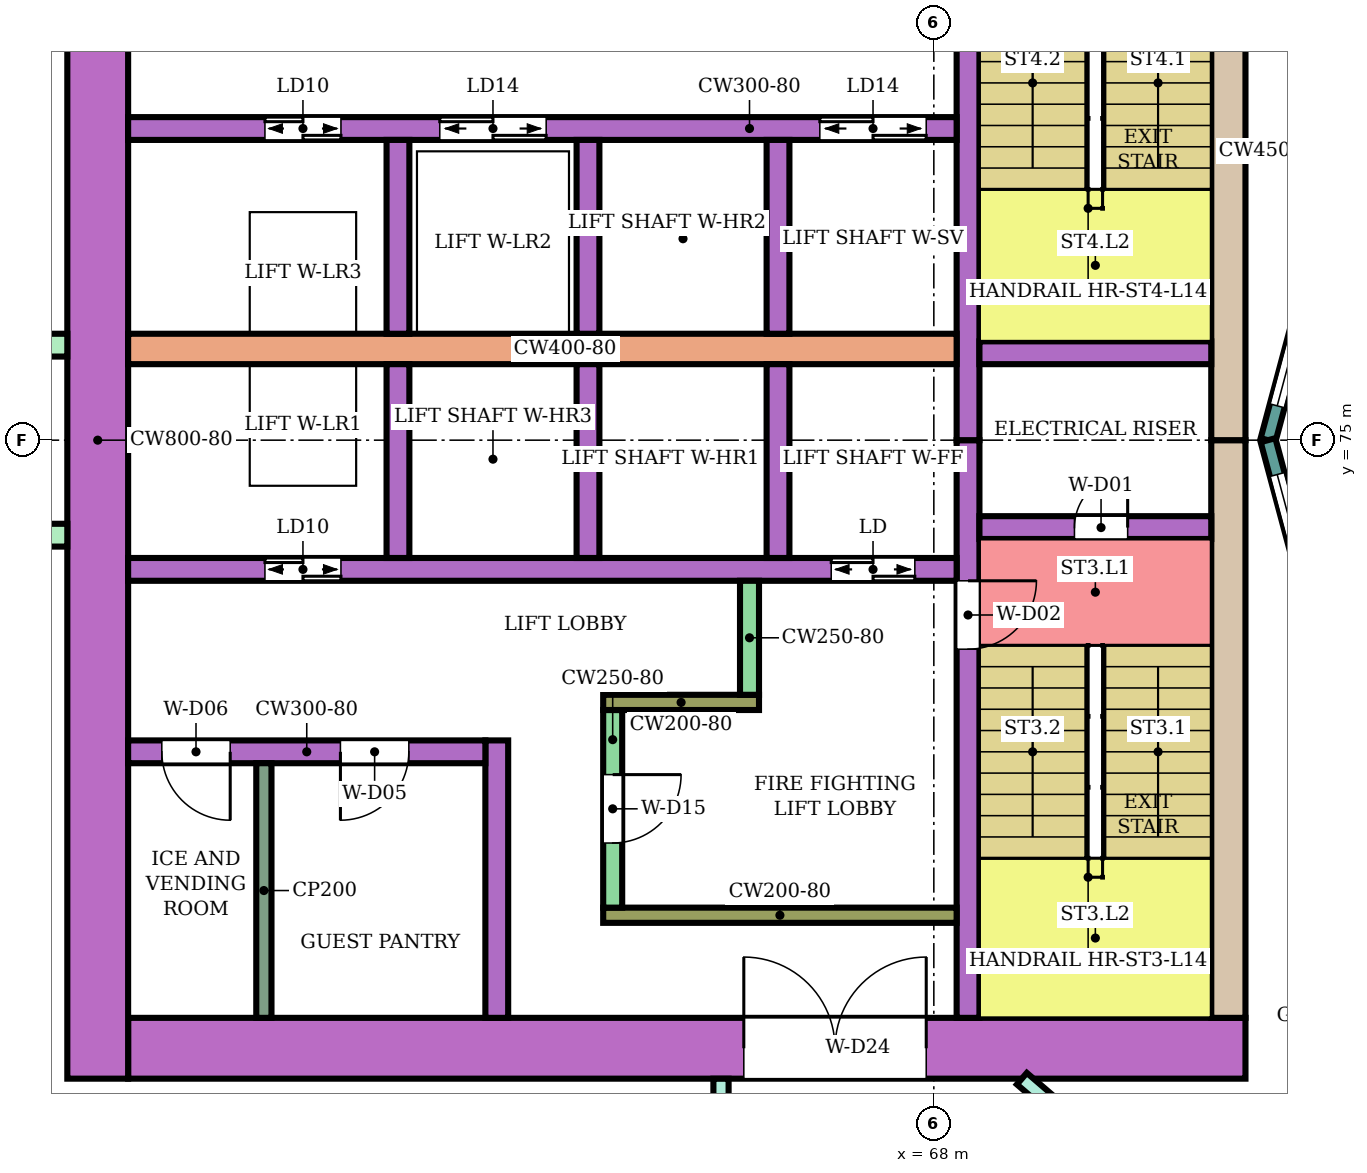
"""IFC4 building model, lengths in metres.
Left out: names, types, materials, properties, quantities, classifications, styles, units other than length and angle.
Written with IfcOpenShell. Run it as: python <this file> out.ifc"""

import sys

from ifc_helpers import new_model, si_unit, direction, frame, frame_2d, origin, place, context, subcontext, project, spatial, rectangle, extrude, element, fill, save


model = new_model("IFC4")
c1 = context("Model", 3, precision=1e-05, world=origin(), true_north=direction((0.0, 1.0)))
c2 = subcontext(c1, "Body", "Model", "MODEL_VIEW")
j1 = project(units=[si_unit("LENGTHUNIT", "METRE"), si_unit("PLANEANGLEUNIT", "RADIAN")], contexts=[c1])
p1 = place(None, origin())
s1 = spatial("IfcSite", under=j1, at=p1, CompositionType="ELEMENT")
p2 = place(p1, origin())
s2 = spatial("IfcBuilding", under=s1, at=p2, CompositionType="ELEMENT")
p3 = place(p2, frame((0.0, 0.0, 63.0)))
s3 = spatial("IfcBuildingStorey", under=s2, at=p3, CompositionType="ELEMENT", Elevation=63.0)
p4 = place(p3, frame((72.1, 67.0, 0.0), z_axis=(0.0, 0.0, 1.0), x_axis=(-1.0, 0.0, 0.0)))
e1 = element("IfcWall", 1, at=p4, inside=s3, PredefinedType="SHEAR", context=c2, shape_type="SweptSolid", body=[
    extrude(rectangle(XDim=14.7, YDim=0.8, at=frame_2d((7.35, 0.0))), origin(), (0.0, 0.0, 1.0), 3.48),
])
p5 = place(p4, frame((4.2, 0.0, 0.0)))
e2 = element("IfcOpeningElement", 2, at=p5, cuts=e1, PredefinedType="OPENING", context=c2, shape_type="SweptSolid", body=[
    extrude(rectangle(XDim=2.4, YDim=2.4, at=frame_2d((1.2, 1.2))), frame((0.0, 0.41, 0.0), z_axis=(0.0, -1.0, 0.0), x_axis=(1.0, 0.0, 0.0)), (0.0, 0.0, 1.0), 0.82),
])
for number, where, z_axis, x_axis in (
    (3, (71.875, 75.0, 0.0), (0.0, 0.0, 1.0), (0.0, -1.0, 0.0)),
    (4, (71.875, 82.6, 0.0), (0.0, 0.0, 1.0), (0.0, -1.0, 0.0)),
):
    element("IfcWall", number, at=place(p3, frame(where, z_axis=z_axis, x_axis=x_axis)), inside=s3, PredefinedType="SHEAR", context=c2, shape_type="SweptSolid", body=[
        extrude(rectangle(XDim=7.6, YDim=0.45, at=frame_2d((3.8, 0.0))), origin(), (0.0, 0.0, 1.0), 3.48),
    ])
p6 = place(p3, frame((57.0, 83.4, 0.0), z_axis=(0.0, 0.0, 1.0), x_axis=(0.0, -1.0, 0.0)))
e5 = element("IfcWall", 5, at=p6, inside=s3, PredefinedType="SHEAR", context=c2, shape_type="SweptSolid", body=[
    extrude(rectangle(XDim=16.8, YDim=0.8, at=frame_2d((8.4, 0.0))), origin(), (0.0, 0.0, 1.0), 3.48),
])
p7 = place(p3, frame((68.45, 75.0, 0.0), z_axis=(0.0, 0.0, 1.0), x_axis=(0.0, -1.0, 0.0)))
e6 = element("IfcWall", 6, at=p7, inside=s3, PredefinedType="SHEAR", context=c2, shape_type="SweptSolid", body=[
    extrude(rectangle(XDim=7.6, YDim=0.3, at=frame_2d((3.8, 0.0))), origin(), (0.0, 0.0, 1.0), 3.48),
])
p8 = place(p7, frame((1.85, 0.0, 0.0)))
e7 = element("IfcOpeningElement", 7, at=p8, cuts=e6, PredefinedType="OPENING", context=c2, shape_type="SweptSolid", body=[
    extrude(rectangle(XDim=0.9, YDim=2.1, at=frame_2d((0.45, 1.05))), frame((0.0, 0.16, 0.0), z_axis=(0.0, -1.0, 0.0), x_axis=(1.0, 0.0, 0.0)), (0.0, 0.0, 1.0), 0.32),
])
p9 = place(p3, frame((68.45, 82.6, 0.0), z_axis=(0.0, 0.0, 1.0), x_axis=(0.0, -1.0, 0.0)))
e8 = element("IfcWall", 8, at=p9, inside=s3, PredefinedType="SHEAR", context=c2, shape_type="SweptSolid", body=[
    extrude(rectangle(XDim=7.6, YDim=0.3, at=frame_2d((3.8, 0.0))), origin(), (0.0, 0.0, 1.0), 3.48),
])
p10 = place(p9, frame((0.25, 0.0, 0.0)))
e9 = element("IfcOpeningElement", 9, at=p10, cuts=e8, PredefinedType="OPENING", context=c2, shape_type="SweptSolid", body=[
    extrude(rectangle(XDim=0.9, YDim=2.1, at=frame_2d((0.45, 1.05))), frame((0.0, 0.16, 0.0), z_axis=(0.0, -1.0, 0.0), x_axis=(1.0, 0.0, 0.0)), (0.0, 0.0, 1.0), 0.32),
])
p11 = place(p3, frame((71.65, 73.85, 0.0), z_axis=(0.0, 0.0, 1.0), x_axis=(-1.0, 0.0, 0.0)))
e10 = element("IfcWall", 10, at=p11, inside=s3, PredefinedType="SHEAR", context=c2, shape_type="SweptSolid", body=[
    extrude(rectangle(XDim=3.05, YDim=0.3, at=frame_2d((1.525, 0.0))), origin(), (0.0, 0.0, 1.0), 3.48),
])
p12 = place(p11, frame((1.1, 0.0, 0.0)))
e11 = element("IfcOpeningElement", 11, at=p12, cuts=e10, PredefinedType="OPENING", context=c2, shape_type="SweptSolid", body=[
    extrude(rectangle(XDim=0.7, YDim=2.0, at=frame_2d((0.35, 1.0))), frame((0.0, 0.16, 0.0), z_axis=(0.0, -1.0, 0.0), x_axis=(1.0, 0.0, 0.0)), (0.0, 0.0, 1.0), 0.32),
])
p13 = place(p3, frame((71.65, 76.15, 0.0), z_axis=(0.0, 0.0, 1.0), x_axis=(-1.0, 0.0, 0.0)))
e12 = element("IfcWall", 12, at=p13, inside=s3, PredefinedType="SHEAR", context=c2, shape_type="SweptSolid", body=[
    extrude(rectangle(XDim=3.05, YDim=0.3, at=frame_2d((1.525, 0.0))), origin(), (0.0, 0.0, 1.0), 3.48),
])
p14 = place(p3, frame((68.3, 73.3, 0.0), z_axis=(0.0, 0.0, 1.0), x_axis=(-1.0, 0.0, 0.0)))
e13 = element("IfcWall", 13, at=p14, inside=s3, PredefinedType="SHEAR", context=c2, shape_type="SweptSolid", body=[
    extrude(rectangle(XDim=10.9, YDim=0.3, at=frame_2d((5.45, 0.0))), origin(), (0.0, 0.0, 1.0), 3.48),
])
p15 = place(p14, frame((0.55, 0.0, 0.0)))
e14 = element("IfcOpeningElement", 14, at=p15, cuts=e13, PredefinedType="OPENING", context=c2, shape_type="SweptSolid", body=[
    extrude(rectangle(XDim=1.1, YDim=2.1, at=frame_2d((0.55, 1.05))), frame((0.0, 0.16, 0.0), z_axis=(0.0, -1.0, 0.0), x_axis=(1.0, 0.0, 0.0)), (0.0, 0.0, 1.0), 0.32),
])
p16 = place(p14, frame((8.1, 0.0, 0.0)))
e15 = element("IfcOpeningElement", 15, at=p16, cuts=e13, PredefinedType="OPENING", context=c2, shape_type="SweptSolid", body=[
    extrude(rectangle(XDim=1.0, YDim=2.1, at=frame_2d((0.5, 1.05))), frame((0.0, 0.16, 0.0), z_axis=(0.0, -1.0, 0.0), x_axis=(1.0, 0.0, 0.0)), (0.0, 0.0, 1.0), 0.32),
])
p17 = place(p3, frame((68.3, 76.2, 0.0), z_axis=(0.0, 0.0, 1.0), x_axis=(-1.0, 0.0, 0.0)))
e16 = element("IfcWall", 16, at=p17, inside=s3, PredefinedType="SHEAR", context=c2, shape_type="SweptSolid", body=[
    extrude(rectangle(XDim=10.9, YDim=0.4, at=frame_2d((5.45, 0.0))), origin(), (0.0, 0.0, 1.0), 3.48),
])
p18 = place(p3, frame((68.3, 79.1, 0.0), z_axis=(0.0, 0.0, 1.0), x_axis=(-1.0, 0.0, 0.0)))
e17 = element("IfcWall", 17, at=p18, inside=s3, PredefinedType="SHEAR", context=c2, shape_type="SweptSolid", body=[
    extrude(rectangle(XDim=10.9, YDim=0.3, at=frame_2d((5.45, 0.0))), origin(), (0.0, 0.0, 1.0), 3.48),
])
p19 = place(p18, frame((0.4, 0.0, 0.0)))
e18 = element("IfcOpeningElement", 18, at=p19, cuts=e17, PredefinedType="OPENING", context=c2, shape_type="SweptSolid", body=[
    extrude(rectangle(XDim=1.4, YDim=2.1, at=frame_2d((0.7, 1.05))), frame((0.0, 0.16, 0.0), z_axis=(0.0, -1.0, 0.0), x_axis=(1.0, 0.0, 0.0)), (0.0, 0.0, 1.0), 0.32),
])
p20 = place(p18, frame((5.4, 0.0, 0.0)))
e19 = element("IfcOpeningElement", 19, at=p20, cuts=e17, PredefinedType="OPENING", context=c2, shape_type="SweptSolid", body=[
    extrude(rectangle(XDim=1.4, YDim=2.1, at=frame_2d((0.7, 1.05))), frame((0.0, 0.16, 0.0), z_axis=(0.0, -1.0, 0.0), x_axis=(1.0, 0.0, 0.0)), (0.0, 0.0, 1.0), 0.32),
])
p21 = place(p18, frame((8.1, 0.0, 0.0)))
e20 = element("IfcOpeningElement", 20, at=p21, cuts=e17, PredefinedType="OPENING", context=c2, shape_type="SweptSolid", body=[
    extrude(rectangle(XDim=1.0, YDim=2.1, at=frame_2d((0.5, 1.05))), frame((0.0, 0.16, 0.0), z_axis=(0.0, -1.0, 0.0), x_axis=(1.0, 0.0, 0.0)), (0.0, 0.0, 1.0), 0.32),
])
for number, where, z_axis, x_axis in (
    (21, (65.95, 76.0, 0.0), (0.0, 0.0, 1.0), (0.0, -1.0, 0.0)),
    (22, (63.45, 76.0, 0.0), (0.0, 0.0, 1.0), (0.0, -1.0, 0.0)),
    (23, (60.95, 76.0, 0.0), (0.0, 0.0, 1.0), (0.0, -1.0, 0.0)),
    (24, (65.95, 78.95, 0.0), (0.0, 0.0, 1.0), (0.0, -1.0, 0.0)),
    (25, (63.45, 78.95, 0.0), (0.0, 0.0, 1.0), (0.0, -1.0, 0.0)),
    (26, (60.95, 78.95, 0.0), (0.0, 0.0, 1.0), (0.0, -1.0, 0.0)),
):
    element("IfcWall", number, at=place(p3, frame(where, z_axis=z_axis, x_axis=x_axis)), inside=s3, PredefinedType="SHEAR", context=c2, shape_type="SweptSolid", body=[
        extrude(rectangle(XDim=2.55, YDim=0.3, at=frame_2d((1.275, 0.0))), origin(), (0.0, 0.0, 1.0), 3.48),
    ])
p22 = place(p3, frame((68.3, 68.75, 0.0), z_axis=(0.0, 0.0, 1.0), x_axis=(-1.0, 0.0, 0.0)))
e27 = element("IfcWall", 27, at=p22, inside=s3, PredefinedType="SHEAR", context=c2, shape_type="SweptSolid", body=[
    extrude(rectangle(XDim=4.65, YDim=0.2, at=frame_2d((2.325, 0.0))), origin(), (0.0, 0.0, 1.0), 3.48),
])
p23 = place(p3, frame((63.775, 71.45, 0.0), z_axis=(0.0, 0.0, 1.0), x_axis=(0.0, -1.0, 0.0)))
e28 = element("IfcWall", 28, at=p23, inside=s3, PredefinedType="SHEAR", context=c2, shape_type="SweptSolid", body=[
    extrude(rectangle(XDim=2.6, YDim=0.25, at=frame_2d((1.3, 0.0))), origin(), (0.0, 0.0, 1.0), 3.48),
])
p24 = place(p23, frame((0.85, 0.0, 0.0)))
e29 = element("IfcOpeningElement", 29, at=p24, cuts=e28, PredefinedType="OPENING", context=c2, shape_type="SweptSolid", body=[
    extrude(rectangle(XDim=0.9, YDim=2.1, at=frame_2d((0.45, 1.05))), frame((0.0, 0.135, 0.0), z_axis=(0.0, -1.0, 0.0), x_axis=(1.0, 0.0, 0.0)), (0.0, 0.0, 1.0), 0.27),
])
p25 = place(p3, frame((65.7, 71.55, 0.0), z_axis=(0.0, 0.0, 1.0), x_axis=(-1.0, 0.0, 0.0)))
e30 = element("IfcWall", 30, at=p25, inside=s3, PredefinedType="SHEAR", context=c2, shape_type="SweptSolid", body=[
    extrude(rectangle(XDim=2.05, YDim=0.2, at=frame_2d((1.025, 0.0))), origin(), (0.0, 0.0, 1.0), 3.48),
])
p26 = place(p3, frame((65.575, 73.15, 0.0), z_axis=(0.0, 0.0, 1.0), x_axis=(0.0, -1.0, 0.0)))
e31 = element("IfcWall", 31, at=p26, inside=s3, PredefinedType="SHEAR", context=c2, shape_type="SweptSolid", body=[
    extrude(rectangle(XDim=1.5, YDim=0.25, at=frame_2d((0.75, 0.0))), origin(), (0.0, 0.0, 1.0), 3.48),
])
p27 = place(p3, frame((62.25, 71.05, 0.0), z_axis=(0.0, 0.0, 1.0), x_axis=(0.0, -1.0, 0.0)))
e32 = element("IfcWall", 32, at=p27, inside=s3, PredefinedType="SHEAR", context=c2, shape_type="SweptSolid", body=[
    extrude(rectangle(XDim=3.65, YDim=0.3, at=frame_2d((1.825, 0.0))), origin(), (0.0, 0.0, 1.0), 3.48),
])
p28 = place(p3, frame((62.1, 70.9, 0.0), z_axis=(0.0, 0.0, 1.0), x_axis=(-1.0, 0.0, 0.0)))
e33 = element("IfcWall", 33, at=p28, inside=s3, PredefinedType="SHEAR", context=c2, shape_type="SweptSolid", body=[
    extrude(rectangle(XDim=4.7, YDim=0.3, at=frame_2d((2.35, 0.0))), origin(), (0.0, 0.0, 1.0), 3.48),
])
p29 = place(p28, frame((1.007, 0.0, 0.0)))
e34 = element("IfcOpeningElement", 34, at=p29, cuts=e33, PredefinedType="OPENING", context=c2, shape_type="SweptSolid", body=[
    extrude(rectangle(XDim=0.9, YDim=2.1, at=frame_2d((0.45, 1.05))), frame((0.0, 0.16, 0.0), z_axis=(0.0, -1.0, 0.0), x_axis=(1.0, 0.0, 0.0)), (0.0, 0.0, 1.0), 0.32),
])
p30 = place(p28, frame((3.357, 0.0, 0.0)))
e35 = element("IfcOpeningElement", 35, at=p30, cuts=e33, PredefinedType="OPENING", context=c2, shape_type="SweptSolid", body=[
    extrude(rectangle(XDim=0.9, YDim=2.1, at=frame_2d((0.45, 1.05))), frame((0.0, 0.16, 0.0), z_axis=(0.0, -1.0, 0.0), x_axis=(1.0, 0.0, 0.0)), (0.0, 0.0, 1.0), 0.32),
])
for number, where, z_axis, x_axis in (
    (36, (56.6, 76.25, 0.0), (0.0, 0.0, 1.0), (-1.0, 0.0, 0.0)),
    (37, (56.6, 73.75, 0.0), (0.0, 0.0, 1.0), (-1.0, 0.0, 0.0)),
):
    element("IfcWall", number, at=place(p3, frame(where, z_axis=z_axis, x_axis=x_axis)), inside=s3, PredefinedType="NOTDEFINED", context=c2, shape_type="SweptSolid", body=[
        extrude(rectangle(XDim=2.416, YDim=0.3, at=frame_2d((1.208, 0.0))), origin(), (0.0, 0.0, 1.0), 3.8),
    ])
p31 = place(p3, frame((73.415, 78.802, 0.0), z_axis=(0.0, 0.0, 1.0), x_axis=(-0.258789828301, -0.965933654434, 0.0)))
e38 = element("IfcWall", 38, at=p31, inside=s3, PredefinedType="NOTDEFINED", context=c2, shape_type="SweptSolid", body=[
    extrude(rectangle(XDim=3.936, YDim=0.2, at=frame_2d((1.968, 0.0))), origin(), (0.0, 0.0, 1.0), 3.8),
])
p32 = place(p31, frame((0.468, 0.0, 0.9)))
e39 = element("IfcOpeningElement", 39, at=p32, cuts=e38, PredefinedType="OPENING", context=c2, shape_type="SweptSolid", body=[
    extrude(rectangle(XDim=3.0, YDim=2.3, at=frame_2d((1.5, 1.15))), frame((0.0, 0.11, 0.0), z_axis=(0.0, -1.0, 0.0), x_axis=(1.0, 0.0, 0.0)), (0.0, 0.0, 1.0), 0.22),
])
p33 = place(p3, frame((72.396, 75.0, 0.0), z_axis=(0.0, 0.0, 1.0), x_axis=(0.258789828301, -0.965933654434, 0.0)))
e40 = element("IfcWall", 40, at=p33, inside=s3, PredefinedType="NOTDEFINED", context=c2, shape_type="SweptSolid", body=[
    extrude(rectangle(XDim=3.936, YDim=0.2, at=frame_2d((1.968, 0.0))), origin(), (0.0, 0.0, 1.0), 3.8),
])
p34 = place(p33, frame((0.468, 0.0, 0.9)))
e41 = element("IfcOpeningElement", 41, at=p34, cuts=e40, PredefinedType="OPENING", context=c2, shape_type="SweptSolid", body=[
    extrude(rectangle(XDim=3.0, YDim=2.3, at=frame_2d((1.5, 1.15))), frame((0.0, 0.11, 0.0), z_axis=(0.0, -1.0, 0.0), x_axis=(1.0, 0.0, 0.0)), (0.0, 0.0, 1.0), 0.22),
])
p35 = place(p3, frame((65.2, 65.2, 0.0), z_axis=(0.0, 0.0, 1.0), x_axis=(0.0, 1.0, 0.0)))
e42 = element("IfcWall", 42, at=p35, inside=s3, PredefinedType="PARTITIONING", context=c2, shape_type="SweptSolid", body=[
    extrude(rectangle(XDim=1.399, YDim=0.2, at=frame_2d((0.7, 0.0))), origin(), (0.0, 0.0, 1.0), 3.35),
])
p36 = place(p3, frame((69.158, 66.6, 0.0), z_axis=(0.0, 0.0, 1.0), x_axis=(0.757976058094, -0.652282373943, 0.0)))
e43 = element("IfcWall", 43, at=p36, inside=s3, PredefinedType="PARTITIONING", context=c2, shape_type="SweptSolid", body=[
    extrude(rectangle(XDim=5.16, YDim=0.2, at=frame_2d((2.58, 0.0))), origin(), (0.0, 0.0, 1.0), 3.35),
])
p37 = place(p36, frame((1.6, 0.0, 0.0)))
e44 = element("IfcOpeningElement", 44, at=p37, cuts=e43, PredefinedType="OPENING", context=c2, shape_type="SweptSolid", body=[
    extrude(rectangle(XDim=1.0, YDim=2.1, at=frame_2d((0.5, 1.05))), frame((0.0, 0.11, 0.0), z_axis=(0.0, -1.0, 0.0), x_axis=(1.0, 0.0, 0.0)), (0.0, 0.0, 1.0), 0.22),
])
p38 = place(p3, frame((71.596, 64.635, 0.0), z_axis=(0.0, 0.0, 1.0), x_axis=(0.652285007511, 0.757973791748, 0.0)))
e45 = element("IfcWall", 45, at=p38, inside=s3, PredefinedType="PARTITIONING", context=c2, shape_type="SweptSolid", body=[
    extrude(rectangle(XDim=2.65, YDim=0.1, at=frame_2d((1.325, 0.0))), origin(), (0.0, 0.0, 1.0), 3.35),
])
p39 = place(p38, frame((0.6, 0.0, 0.0)))
e46 = element("IfcOpeningElement", 46, at=p39, cuts=e45, PredefinedType="OPENING", context=c2, shape_type="SweptSolid", body=[
    extrude(rectangle(XDim=0.8, YDim=2.1, at=frame_2d((0.4, 1.05))), frame((0.0, 0.06, 0.0), z_axis=(0.0, -1.0, 0.0), x_axis=(1.0, 0.0, 0.0)), (0.0, 0.0, 1.0), 0.12),
])
p40 = place(p3, frame((59.186, 70.75, 0.0), z_axis=(0.0, 0.0, 1.0), x_axis=(0.0, -1.0, 0.0)))
e47 = element("IfcWall", 47, at=p40, inside=s3, PredefinedType="PARTITIONING", context=c2, shape_type="SweptSolid", body=[
    extrude(rectangle(XDim=3.35, YDim=0.2, at=frame_2d((1.675, 0.0))), origin(), (0.0, 0.0, 1.0), 3.48),
])
p41 = place(p32, origin())
e48 = element("IfcWindow", 48, at=p41, inside=s3, PartitioningType="SINGLE_PANEL", PredefinedType="WINDOW", context=c2, shape_type="SweptSolid", body=[
    extrude(rectangle(XDim=3.0, YDim=2.3, at=frame_2d((1.5, 1.15))), frame((0.0, 0.03, 0.0), z_axis=(0.0, -1.0, 0.0), x_axis=(1.0, 0.0, 0.0)), (0.0, 0.0, 1.0), 0.06),
])
fill(e39, e48)
p42 = place(p34, origin())
e49 = element("IfcWindow", 49, at=p42, inside=s3, PartitioningType="SINGLE_PANEL", PredefinedType="WINDOW", context=c2, shape_type="SweptSolid", body=[
    extrude(rectangle(XDim=3.0, YDim=2.3, at=frame_2d((1.5, 1.15))), frame((0.0, 0.03, 0.0), z_axis=(0.0, -1.0, 0.0), x_axis=(1.0, 0.0, 0.0)), (0.0, 0.0, 1.0), 0.06),
])
fill(e41, e49)
p43 = place(p12, frame((0.7, 0.0, 0.0), z_axis=(0.0, 0.0, 1.0), x_axis=(-1.0, 0.0, 0.0)))
e50 = element("IfcDoor", 50, at=p43, inside=s3, OperationType="SINGLE_SWING_RIGHT", PredefinedType="DOOR", context=c2, shape_type="SweptSolid", body=[
    extrude(rectangle(XDim=0.7, YDim=2.0, at=frame_2d((0.35, 1.0))), frame((0.0, 0.025, 0.0), z_axis=(0.0, -1.0, 0.0), x_axis=(1.0, 0.0, 0.0)), (0.0, 0.0, 1.0), 0.05),
])
fill(e11, e50)
p44 = place(p8, origin())
e51 = element("IfcDoor", 51, at=p44, inside=s3, OperationType="SINGLE_SWING_LEFT", PredefinedType="DOOR", context=c2, shape_type="SweptSolid", body=[
    extrude(rectangle(XDim=0.9, YDim=2.1, at=frame_2d((0.45, 1.05))), frame((0.0, 0.025, 0.0), z_axis=(0.0, -1.0, 0.0), x_axis=(1.0, 0.0, 0.0)), (0.0, 0.0, 1.0), 0.05),
])
fill(e7, e51)
p45 = place(p15, origin())
e52 = element("IfcDoor", 52, at=p45, inside=s3, OperationType="DOUBLE_DOOR_SLIDING", PredefinedType="DOOR", context=c2, shape_type="SweptSolid", body=[
    extrude(rectangle(XDim=1.1, YDim=2.1, at=frame_2d((0.55, 1.05))), frame((0.0, 0.025, 0.0), z_axis=(0.0, -1.0, 0.0), x_axis=(1.0, 0.0, 0.0)), (0.0, 0.0, 1.0), 0.05),
])
fill(e14, e52)
p46 = place(p16, origin())
e53 = element("IfcDoor", 53, at=p46, inside=s3, OperationType="DOUBLE_DOOR_SLIDING", PredefinedType="DOOR", context=c2, shape_type="SweptSolid", body=[
    extrude(rectangle(XDim=1.0, YDim=2.1, at=frame_2d((0.5, 1.05))), frame((0.0, 0.025, 0.0), z_axis=(0.0, -1.0, 0.0), x_axis=(1.0, 0.0, 0.0)), (0.0, 0.0, 1.0), 0.05),
])
fill(e15, e53)
p47 = place(p19, origin())
e54 = element("IfcDoor", 54, at=p47, inside=s3, OperationType="DOUBLE_DOOR_SLIDING", PredefinedType="DOOR", context=c2, shape_type="SweptSolid", body=[
    extrude(rectangle(XDim=1.4, YDim=2.1, at=frame_2d((0.7, 1.05))), frame((0.0, 0.025, 0.0), z_axis=(0.0, -1.0, 0.0), x_axis=(1.0, 0.0, 0.0)), (0.0, 0.0, 1.0), 0.05),
])
fill(e18, e54)
p48 = place(p20, origin())
e55 = element("IfcDoor", 55, at=p48, inside=s3, OperationType="DOUBLE_DOOR_SLIDING", PredefinedType="DOOR", context=c2, shape_type="SweptSolid", body=[
    extrude(rectangle(XDim=1.4, YDim=2.1, at=frame_2d((0.7, 1.05))), frame((0.0, 0.025, 0.0), z_axis=(0.0, -1.0, 0.0), x_axis=(1.0, 0.0, 0.0)), (0.0, 0.0, 1.0), 0.05),
])
fill(e19, e55)
p49 = place(p21, origin())
e56 = element("IfcDoor", 56, at=p49, inside=s3, OperationType="DOUBLE_DOOR_SLIDING", PredefinedType="DOOR", context=c2, shape_type="SweptSolid", body=[
    extrude(rectangle(XDim=1.0, YDim=2.1, at=frame_2d((0.5, 1.05))), frame((0.0, 0.025, 0.0), z_axis=(0.0, -1.0, 0.0), x_axis=(1.0, 0.0, 0.0)), (0.0, 0.0, 1.0), 0.05),
])
fill(e20, e56)
p50 = place(p24, origin())
e57 = element("IfcDoor", 57, at=p50, inside=s3, OperationType="SINGLE_SWING_LEFT", PredefinedType="DOOR", context=c2, shape_type="SweptSolid", body=[
    extrude(rectangle(XDim=0.9, YDim=2.1, at=frame_2d((0.45, 1.05))), frame((0.0, 0.025, 0.0), z_axis=(0.0, -1.0, 0.0), x_axis=(1.0, 0.0, 0.0)), (0.0, 0.0, 1.0), 0.05),
])
fill(e29, e57)
p51 = place(p29, origin())
e58 = element("IfcDoor", 58, at=p51, inside=s3, OperationType="SINGLE_SWING_RIGHT", PredefinedType="DOOR", context=c2, shape_type="SweptSolid", body=[
    extrude(rectangle(XDim=0.9, YDim=2.1, at=frame_2d((0.45, 1.05))), frame((0.0, 0.025, 0.0), z_axis=(0.0, -1.0, 0.0), x_axis=(1.0, 0.0, 0.0)), (0.0, 0.0, 1.0), 0.05),
])
fill(e34, e58)
p52 = place(p30, origin())
e59 = element("IfcDoor", 59, at=p52, inside=s3, OperationType="SINGLE_SWING_LEFT", PredefinedType="DOOR", context=c2, shape_type="SweptSolid", body=[
    extrude(rectangle(XDim=0.9, YDim=2.1, at=frame_2d((0.45, 1.05))), frame((0.0, 0.025, 0.0), z_axis=(0.0, -1.0, 0.0), x_axis=(1.0, 0.0, 0.0)), (0.0, 0.0, 1.0), 0.05),
])
fill(e35, e59)
p53 = place(p5, frame((2.4, 0.0, 0.0), z_axis=(0.0, 0.0, 1.0), x_axis=(-1.0, 0.0, 0.0)))
e60 = element("IfcDoor", 60, at=p53, inside=s3, OperationType="DOUBLE_DOOR_SINGLE_SWING", PredefinedType="DOOR", context=c2, shape_type="SweptSolid", body=[
    extrude(rectangle(XDim=2.4, YDim=2.4, at=frame_2d((1.2, 1.2))), frame((0.0, 0.025, 0.0), z_axis=(0.0, -1.0, 0.0), x_axis=(1.0, 0.0, 0.0)), (0.0, 0.0, 1.0), 0.05),
])
fill(e2, e60)
save(model, sys.argv[1])
